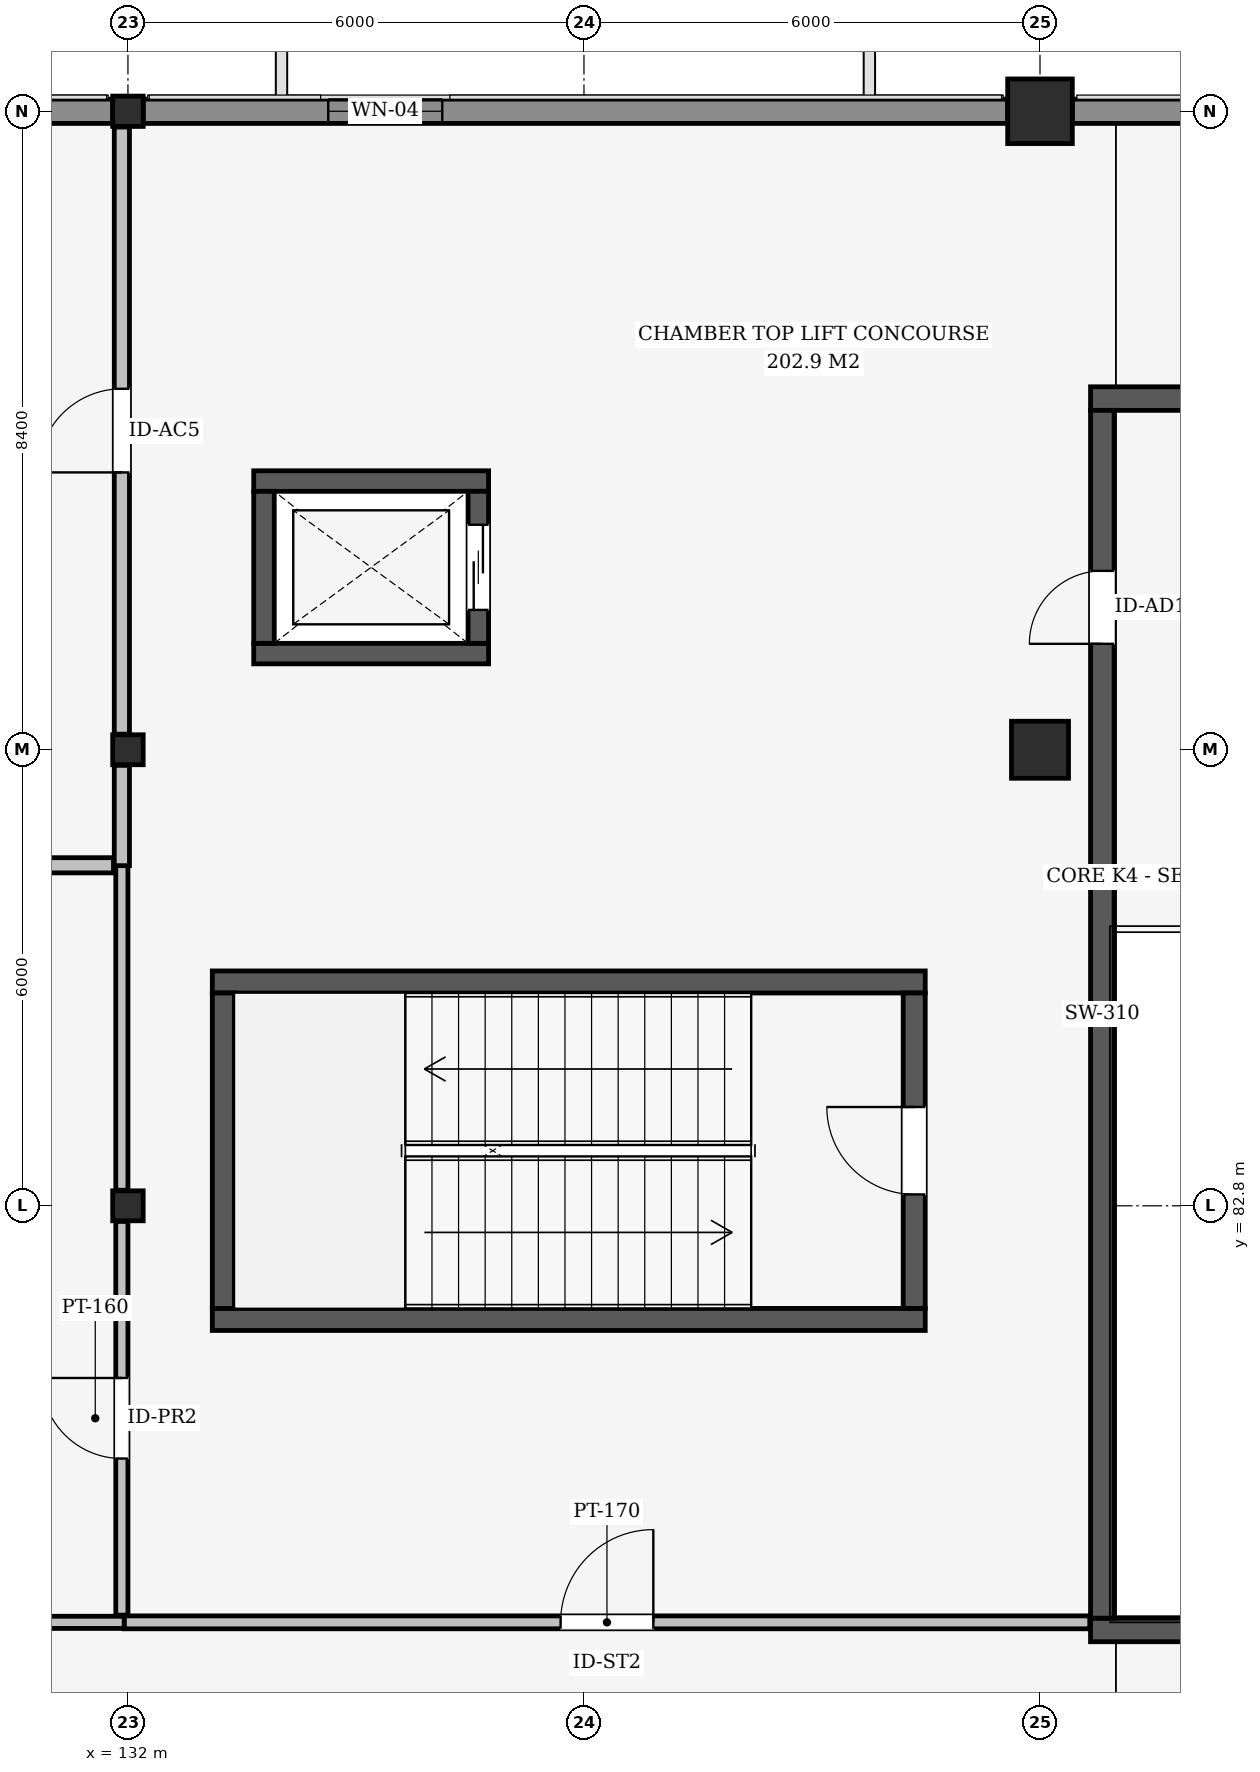
"""IFC4 building model, lengths in metres.
Left out: names, types, materials, properties, quantities, classifications, styles, units other than length and angle.
Written with IfcOpenShell. Run it as: python <this file> out.ifc"""

import sys

from ifc_helpers import new_model, si_unit, direction, frame, frame_2d, origin, origin_2d, place, context, subcontext, project, spatial, rectangle, i_section, extrude, element, fill, save


model = new_model("IFC4")
c1 = context("Model", 3, precision=1e-05, world=origin(), true_north=direction((0.0, 1.0)))
c2 = subcontext(c1, "Body", "Model", "MODEL_VIEW")
j1 = project(units=[si_unit("LENGTHUNIT", "METRE"), si_unit("PLANEANGLEUNIT", "RADIAN")], contexts=[c1])
p1 = place(None, origin())
s1 = spatial("IfcSite", under=j1, at=p1, CompositionType="ELEMENT")
p2 = place(p1, origin())
s2 = spatial("IfcBuilding", under=s1, at=p2, CompositionType="ELEMENT")
p3 = place(p2, frame((0.0, 0.0, 9.3)))
s3 = spatial("IfcBuildingStorey", under=s2, at=p3, CompositionType="ELEMENT", Elevation=9.3)
for number, where, z_axis, x_axis in (
    (1, (132.0, 82.8, 0.0), (0.0, 0.0, 1.0), (1.0, 0.0, 0.0)),
    (2, (132.0, 88.8, 0.0), (0.0, 0.0, 1.0), (1.0, 0.0, 0.0)),
):
    element("IfcColumn", number, at=place(p3, frame(where, z_axis=z_axis, x_axis=x_axis)), inside=s3, PredefinedType="COLUMN", context=c2, shape_type="SweptSolid", body=[
        extrude(i_section(OverallWidth=0.401, OverallDepth=0.394, WebThickness=0.023, FlangeThickness=0.037, at=origin_2d()), origin(), (0.0, 0.0, 1.0), 4.5),
    ])
p4 = place(p3, frame((132.0, 97.2, 0.0), z_axis=(0.0, 0.0, 1.0), x_axis=(1.0, 0.0, 0.0)))
e3 = element("IfcColumn", 3, at=p4, inside=s3, PredefinedType="COLUMN", context=c2, shape_type="SweptSolid", body=[
    extrude(i_section(OverallWidth=0.401, OverallDepth=0.399, WebThickness=0.025, FlangeThickness=0.04, at=origin_2d()), origin(), (0.0, 0.0, 1.0), 4.5),
])
p5 = place(p3, frame((144.0, 88.8, 0.0), z_axis=(0.0, 0.0, 1.0), x_axis=(1.0, 0.0, 0.0)))
e4 = element("IfcColumn", 4, at=p5, inside=s3, PredefinedType="COLUMN", context=c2, shape_type="SweptSolid", body=[
    extrude(rectangle(XDim=0.75, YDim=0.75, at=origin_2d()), origin(), (0.0, 0.0, 1.0), 4.5),
])
p6 = place(p3, frame((144.0, 97.2, 0.0), z_axis=(0.0, 0.0, 1.0), x_axis=(1.0, 0.0, 0.0)))
e5 = element("IfcColumn", 5, at=p6, inside=s3, PredefinedType="COLUMN", context=c2, shape_type="SweptSolid", body=[
    extrude(rectangle(XDim=0.85, YDim=0.85, at=origin_2d()), origin(), (0.0, 0.0, 1.0), 4.5),
])
p7 = place(p3, frame((144.665, 77.22, 0.0), z_axis=(0.0, 0.0, 1.0), x_axis=(1.0, 0.0, 0.0)))
e6 = element("IfcWall", 6, at=p7, inside=s3, PredefinedType="SHEAR", context=c2, shape_type="SweptSolid", body=[
    extrude(rectangle(XDim=12.67, YDim=0.31, at=frame_2d((6.335, 0.0))), origin(), (0.0, 0.0, 1.0), 2.71),
])
p8 = place(p3, frame((144.665, 93.42, 0.0), z_axis=(0.0, 0.0, 1.0), x_axis=(1.0, 0.0, 0.0)))
e7 = element("IfcWall", 7, at=p8, inside=s3, PredefinedType="SHEAR", context=c2, shape_type="SweptSolid", body=[
    extrude(rectangle(XDim=12.67, YDim=0.31, at=frame_2d((6.335, 0.0))), origin(), (0.0, 0.0, 1.0), 4.22),
])
p9 = place(p3, frame((144.82, 77.375, 0.0), z_axis=(0.0, 0.0, 1.0), x_axis=(0.0, 1.0, 0.0)))
e8 = element("IfcWall", 8, at=p9, inside=s3, PredefinedType="SHEAR", context=c2, shape_type="SweptSolid", body=[
    extrude(rectangle(XDim=15.89, YDim=0.31, at=frame_2d((7.945, 0.0))), origin(), (0.0, 0.0, 1.0), 4.22),
])
p10 = place(p9, frame((12.818, 0.0, 0.0)))
e9 = element("IfcOpeningElement", 9, at=p10, cuts=e8, PredefinedType="OPENING", context=c2, shape_type="SweptSolid", body=[
    extrude(rectangle(XDim=0.96, YDim=2.16, at=frame_2d((0.48, 1.08))), frame((0.0, 0.165, 0.0), z_axis=(0.0, -1.0, 0.0), x_axis=(1.0, 0.0, 0.0)), (0.0, 0.0, 1.0), 0.33),
])
p11 = place(p3, frame((120.2, 97.2, 0.0), z_axis=(0.0, 0.0, 1.0), x_axis=(1.0, 0.0, 0.0)))
e10 = element("IfcWall", 10, at=p11, inside=s3, PredefinedType="SOLIDWALL", context=c2, shape_type="SweptSolid", body=[
    extrude(rectangle(XDim=11.599, YDim=0.32, at=frame_2d((5.8, 0.0))), origin(), (0.0, 0.0, 1.0), 3.388),
])
p12 = place(p11, frame((4.899, 0.0, 0.85)))
e11 = element("IfcOpeningElement", 11, at=p12, cuts=e10, PredefinedType="OPENING", context=c2, shape_type="SweptSolid", body=[
    extrude(rectangle(XDim=1.8, YDim=1.65, at=frame_2d((0.9, 0.825))), frame((0.0, 0.17, 0.0), z_axis=(0.0, -1.0, 0.0), x_axis=(1.0, 0.0, 0.0)), (0.0, 0.0, 1.0), 0.34),
])
p13 = place(p3, frame((132.2, 97.2, 0.0), z_axis=(0.0, 0.0, 1.0), x_axis=(1.0, 0.0, 0.0)))
e12 = element("IfcWall", 12, at=p13, inside=s3, PredefinedType="SOLIDWALL", context=c2, shape_type="SweptSolid", body=[
    extrude(rectangle(XDim=11.375, YDim=0.32, at=frame_2d((5.687, 0.0))), origin(), (0.0, 0.0, 1.0), 3.664),
])
p14 = place(p13, frame((2.435, 0.0, 0.85)))
e13 = element("IfcOpeningElement", 13, at=p14, cuts=e12, PredefinedType="OPENING", context=c2, shape_type="SweptSolid", body=[
    extrude(rectangle(XDim=1.5, YDim=1.65, at=frame_2d((0.75, 0.825))), frame((0.0, 0.17, 0.0), z_axis=(0.0, -1.0, 0.0), x_axis=(1.0, 0.0, 0.0)), (0.0, 0.0, 1.0), 0.34),
])
p15 = place(p3, frame((144.425, 97.2, 0.0), z_axis=(0.0, 0.0, 1.0), x_axis=(1.0, 0.0, 0.0)))
e14 = element("IfcWall", 14, at=p15, inside=s3, PredefinedType="SOLIDWALL", context=c2, shape_type="SweptSolid", body=[
    extrude(rectangle(XDim=11.15, YDim=0.32, at=frame_2d((5.575, 0.0))), origin(), (0.0, 0.0, 1.0), 3.664),
])
for number, where, z_axis, x_axis in (
    (15, (133.11, 81.305, 0.0), (0.0, 0.0, 1.0), (1.0, 0.0, 0.0)),
    (16, (133.11, 85.745, 0.0), (0.0, 0.0, 1.0), (1.0, 0.0, 0.0)),
):
    element("IfcWall", number, at=place(p3, frame(where, z_axis=z_axis, x_axis=x_axis)), inside=s3, PredefinedType="SHEAR", context=c2, shape_type="SweptSolid", body=[
        extrude(rectangle(XDim=9.38, YDim=0.29, at=frame_2d((4.69, 0.0))), origin(), (0.0, 0.0, 1.0), 4.22),
    ])
p16 = place(p3, frame((133.255, 81.45, 0.0), z_axis=(0.0, 0.0, 1.0), x_axis=(0.0, 1.0, 0.0)))
e17 = element("IfcWall", 17, at=p16, inside=s3, PredefinedType="SHEAR", context=c2, shape_type="SweptSolid", body=[
    extrude(rectangle(XDim=4.15, YDim=0.29, at=frame_2d((2.075, 0.0))), origin(), (0.0, 0.0, 1.0), 4.22),
])
p17 = place(p3, frame((142.345, 81.45, 0.0), z_axis=(0.0, 0.0, 1.0), x_axis=(0.0, 1.0, 0.0)))
e18 = element("IfcWall", 18, at=p17, inside=s3, PredefinedType="SHEAR", context=c2, shape_type="SweptSolid", body=[
    extrude(rectangle(XDim=4.15, YDim=0.29, at=frame_2d((2.075, 0.0))), origin(), (0.0, 0.0, 1.0), 4.22),
])
p18 = place(p17, frame((1.5, 0.0, 0.0)))
e19 = element("IfcOpeningElement", 19, at=p18, cuts=e18, PredefinedType="OPENING", context=c2, shape_type="SweptSolid", body=[
    extrude(rectangle(XDim=1.15, YDim=2.15, at=frame_2d((0.575, 1.075))), frame((0.0, 0.155, 0.0), z_axis=(0.0, -1.0, 0.0), x_axis=(1.0, 0.0, 0.0)), (0.0, 0.0, 1.0), 0.31),
])
for number, where, z_axis, x_axis in (
    (20, (133.655, 90.065, 0.0), (0.0, 0.0, 1.0), (1.0, 0.0, 0.0)),
    (21, (133.655, 92.335, 0.0), (0.0, 0.0, 1.0), (1.0, 0.0, 0.0)),
):
    element("IfcWall", number, at=place(p3, frame(where, z_axis=z_axis, x_axis=x_axis)), inside=s3, PredefinedType="SHEAR", context=c2, shape_type="SweptSolid", body=[
        extrude(rectangle(XDim=3.09, YDim=0.27, at=frame_2d((1.545, 0.0))), origin(), (0.0, 0.0, 1.0), 4.22),
    ])
p19 = place(p3, frame((133.79, 90.2, 0.0), z_axis=(0.0, 0.0, 1.0), x_axis=(0.0, 1.0, 0.0)))
e22 = element("IfcWall", 22, at=p19, inside=s3, PredefinedType="SHEAR", context=c2, shape_type="SweptSolid", body=[
    extrude(rectangle(XDim=2.0, YDim=0.27, at=frame_2d((1.0, 0.0))), origin(), (0.0, 0.0, 1.0), 4.22),
])
p20 = place(p3, frame((136.61, 90.2, 0.0), z_axis=(0.0, 0.0, 1.0), x_axis=(0.0, 1.0, 0.0)))
e23 = element("IfcWall", 23, at=p20, inside=s3, PredefinedType="SHEAR", context=c2, shape_type="SweptSolid", body=[
    extrude(rectangle(XDim=2.0, YDim=0.27, at=frame_2d((1.0, 0.0))), origin(), (0.0, 0.0, 1.0), 4.22),
])
p21 = place(p20, frame((0.44, 0.0, 0.0)))
e24 = element("IfcOpeningElement", 24, at=p21, cuts=e23, PredefinedType="OPENING", context=c2, shape_type="SweptSolid", body=[
    extrude(rectangle(XDim=1.12, YDim=2.15, at=frame_2d((0.56, 1.075))), frame((0.0, 0.145, 0.0), z_axis=(0.0, -1.0, 0.0), x_axis=(1.0, 0.0, 0.0)), (0.0, 0.0, 1.0), 0.29),
])
p22 = place(p3, frame((131.95, 77.32, 0.0), z_axis=(0.0, 0.0, 1.0), x_axis=(1.0, 0.0, 0.0)))
e25 = element("IfcWall", 25, at=p22, inside=s3, PredefinedType="PARTITIONING", context=c2, shape_type="SweptSolid", body=[
    extrude(rectangle(XDim=12.705, YDim=0.17, at=frame_2d((6.353, 0.0))), origin(), (0.0, 0.0, 1.0), 4.2),
])
p23 = place(p22, frame((5.742, 0.0, 0.0)))
e26 = element("IfcOpeningElement", 26, at=p23, cuts=e25, PredefinedType="OPENING", context=c2, shape_type="SweptSolid", body=[
    extrude(rectangle(XDim=1.22, YDim=2.18, at=frame_2d((0.61, 1.09))), frame((0.0, 0.095, 0.0), z_axis=(0.0, -1.0, 0.0), x_axis=(1.0, 0.0, 0.0)), (0.0, 0.0, 1.0), 0.19),
])
p24 = place(p3, frame((120.17, 77.32, 0.0), z_axis=(0.0, 0.0, 1.0), x_axis=(1.0, 0.0, 0.0)))
e27 = element("IfcWall", 27, at=p24, inside=s3, PredefinedType="PARTITIONING", context=c2, shape_type="SweptSolid", body=[
    extrude(rectangle(XDim=11.78, YDim=0.16, at=frame_2d((5.89, 0.0))), origin(), (0.0, 0.0, 1.0), 4.19),
])
p25 = place(p24, frame((5.36, 0.0, 0.0)))
e28 = element("IfcOpeningElement", 28, at=p25, cuts=e27, PredefinedType="OPENING", context=c2, shape_type="SweptSolid", body=[
    extrude(rectangle(XDim=1.06, YDim=2.22, at=frame_2d((0.53, 1.11))), frame((0.0, 0.09, 0.0), z_axis=(0.0, -1.0, 0.0), x_axis=(1.0, 0.0, 0.0)), (0.0, 0.0, 1.0), 0.18),
])
p26 = place(p3, frame((131.92, 77.415, 0.0), z_axis=(0.0, 0.0, 1.0), x_axis=(0.0, 1.0, 0.0)))
e29 = element("IfcWall", 29, at=p26, inside=s3, PredefinedType="PARTITIONING", context=c2, shape_type="SweptSolid", body=[
    extrude(rectangle(XDim=5.18, YDim=0.16, at=frame_2d((2.59, 0.0))), origin(), (0.0, 0.0, 1.0), 3.764),
])
p27 = place(p26, frame((2.06, 0.0, 0.0)))
e30 = element("IfcOpeningElement", 30, at=p27, cuts=e29, PredefinedType="OPENING", context=c2, shape_type="SweptSolid", body=[
    extrude(rectangle(XDim=1.06, YDim=2.22, at=frame_2d((0.53, 1.11))), frame((0.0, 0.09, 0.0), z_axis=(0.0, -1.0, 0.0), x_axis=(1.0, 0.0, 0.0)), (0.0, 0.0, 1.0), 0.18),
])
p28 = place(p3, frame((131.92, 83.005, 0.0), z_axis=(0.0, 0.0, 1.0), x_axis=(0.0, 1.0, 0.0)))
e31 = element("IfcWall", 31, at=p28, inside=s3, PredefinedType="PARTITIONING", context=c2, shape_type="SweptSolid", body=[
    extrude(rectangle(XDim=4.28, YDim=0.16, at=frame_2d((2.14, 0.0))), origin(), (0.0, 0.0, 1.0), 3.764),
])
p29 = place(p3, frame((131.92, 87.275, 0.0), z_axis=(0.0, 0.0, 1.0), x_axis=(0.0, 1.0, 0.0)))
e32 = element("IfcWall", 32, at=p29, inside=s3, PredefinedType="PARTITIONING", context=c2, shape_type="SweptSolid", body=[
    extrude(rectangle(XDim=1.32, YDim=0.2, at=frame_2d((0.66, 0.0))), origin(), (0.0, 0.0, 1.0), 3.764),
])
p30 = place(p3, frame((131.92, 89.005, 0.0), z_axis=(0.0, 0.0, 1.0), x_axis=(0.0, 1.0, 0.0)))
e33 = element("IfcWall", 33, at=p30, inside=s3, PredefinedType="PARTITIONING", context=c2, shape_type="SweptSolid", body=[
    extrude(rectangle(XDim=7.988, YDim=0.2, at=frame_2d((3.994, 0.0))), origin(), (0.0, 0.0, 1.0), 3.764),
])
p31 = place(p30, frame((3.444, 0.0, 0.0)))
e34 = element("IfcOpeningElement", 34, at=p31, cuts=e33, PredefinedType="OPENING", context=c2, shape_type="SweptSolid", body=[
    extrude(rectangle(XDim=1.1, YDim=2.26, at=frame_2d((0.55, 1.13))), frame((0.0, 0.11, 0.0), z_axis=(0.0, -1.0, 0.0), x_axis=(1.0, 0.0, 0.0)), (0.0, 0.0, 1.0), 0.22),
])
p32 = place(p3, frame((120.17, 87.28, 0.0), z_axis=(0.0, 0.0, 1.0), x_axis=(1.0, 0.0, 0.0)))
e35 = element("IfcWall", 35, at=p32, inside=s3, PredefinedType="PARTITIONING", context=c2, shape_type="SweptSolid", body=[
    extrude(rectangle(XDim=11.64, YDim=0.2, at=frame_2d((5.82, 0.0))), origin(), (0.0, 0.0, 1.0), 4.19),
])
p33 = place(p14, origin())
e36 = element("IfcWindow", 36, at=p33, inside=s3, PartitioningType="SINGLE_PANEL", PredefinedType="WINDOW", context=c2, shape_type="SweptSolid", body=[
    extrude(rectangle(XDim=1.5, YDim=1.65, at=frame_2d((0.75, 0.825))), frame((0.0, 0.03, 0.0), z_axis=(0.0, -1.0, 0.0), x_axis=(1.0, 0.0, 0.0)), (0.0, 0.0, 1.0), 0.06),
])
fill(e13, e36)
p34 = place(p18, origin())
e37 = element("IfcDoor", 37, at=p34, inside=s3, OperationType="SINGLE_SWING_RIGHT", PredefinedType="DOOR", context=c2, shape_type="SweptSolid", body=[
    extrude(rectangle(XDim=1.15, YDim=2.15, at=frame_2d((0.575, 1.075))), frame((0.0, 0.025, 0.0), z_axis=(0.0, -1.0, 0.0), x_axis=(1.0, 0.0, 0.0)), (0.0, 0.0, 1.0), 0.05),
])
fill(e19, e37)
p35 = place(p21, origin())
e38 = element("IfcDoor", 38, at=p35, inside=s3, OperationType="SLIDING_TO_LEFT", PredefinedType="DOOR", context=c2, shape_type="SweptSolid", body=[
    extrude(rectangle(XDim=1.12, YDim=2.15, at=frame_2d((0.56, 1.075))), frame((0.0, 0.025, 0.0), z_axis=(0.0, -1.0, 0.0), x_axis=(1.0, 0.0, 0.0)), (0.0, 0.0, 1.0), 0.05),
])
fill(e24, e38)
p36 = place(p23, origin())
e39 = element("IfcDoor", 39, at=p36, inside=s3, OperationType="SINGLE_SWING_RIGHT", PredefinedType="DOOR", context=c2, shape_type="SweptSolid", body=[
    extrude(rectangle(XDim=1.22, YDim=2.18, at=frame_2d((0.61, 1.09))), frame((0.0, 0.025, 0.0), z_axis=(0.0, -1.0, 0.0), x_axis=(1.0, 0.0, 0.0)), (0.0, 0.0, 1.0), 0.05),
])
fill(e26, e39)
p37 = place(p10, origin())
e40 = element("IfcDoor", 40, at=p37, inside=s3, OperationType="SINGLE_SWING_LEFT", PredefinedType="DOOR", context=c2, shape_type="SweptSolid", body=[
    extrude(rectangle(XDim=0.96, YDim=2.16, at=frame_2d((0.48, 1.08))), frame((0.0, 0.025, 0.0), z_axis=(0.0, -1.0, 0.0), x_axis=(1.0, 0.0, 0.0)), (0.0, 0.0, 1.0), 0.05),
])
fill(e9, e40)
p38 = place(p27, origin())
e41 = element("IfcDoor", 41, at=p38, inside=s3, OperationType="SINGLE_SWING_RIGHT", PredefinedType="DOOR", context=c2, shape_type="SweptSolid", body=[
    extrude(rectangle(XDim=1.06, YDim=2.22, at=frame_2d((0.53, 1.11))), frame((0.0, 0.025, 0.0), z_axis=(0.0, -1.0, 0.0), x_axis=(1.0, 0.0, 0.0)), (0.0, 0.0, 1.0), 0.05),
])
fill(e30, e41)
p39 = place(p31, origin())
e42 = element("IfcDoor", 42, at=p39, inside=s3, OperationType="SINGLE_SWING_LEFT", PredefinedType="DOOR", context=c2, shape_type="SweptSolid", body=[
    extrude(rectangle(XDim=1.1, YDim=2.26, at=frame_2d((0.55, 1.13))), frame((0.0, 0.025, 0.0), z_axis=(0.0, -1.0, 0.0), x_axis=(1.0, 0.0, 0.0)), (0.0, 0.0, 1.0), 0.05),
])
fill(e34, e42)
save(model, sys.argv[1])
